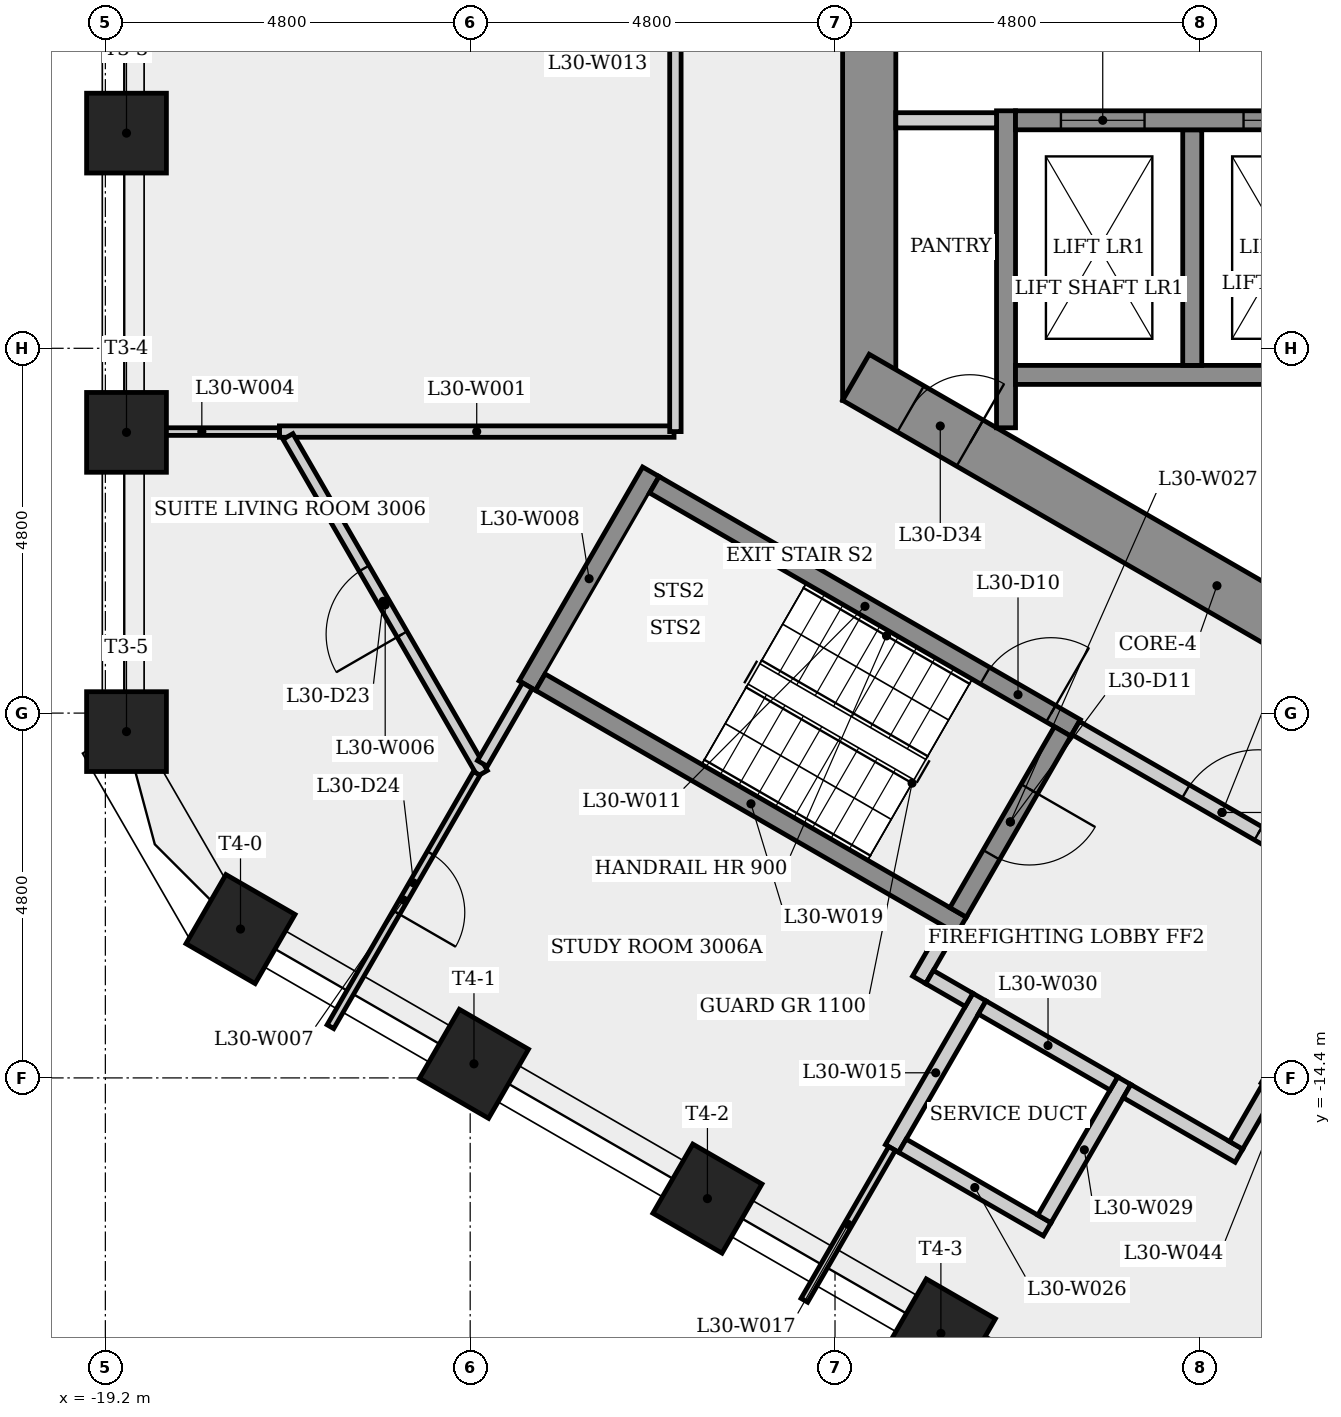
"""IFC4 building model, lengths in metres.
Left out: names, types, materials, properties, quantities, classifications, styles, units other than length and angle.
Written with IfcOpenShell. Run it as: python <this file> out.ifc"""

import sys

from ifc_helpers import new_model, si_unit, direction, frame, frame_2d, origin, origin_2d, place, context, subcontext, project, spatial, rectangle, extrude, element, fill, save


model = new_model("IFC4")
c1 = context("Model", 3, precision=1e-05, world=origin(), true_north=direction((0.0, 1.0)))
c2 = subcontext(c1, "Body", "Model", "MODEL_VIEW")
j1 = project(units=[si_unit("LENGTHUNIT", "METRE"), si_unit("PLANEANGLEUNIT", "RADIAN")], contexts=[c1])
p1 = place(None, origin())
s1 = spatial("IfcSite", under=j1, at=p1, CompositionType="ELEMENT")
p2 = place(p1, origin())
s2 = spatial("IfcBuilding", under=s1, at=p2, CompositionType="ELEMENT")
p3 = place(p2, frame((0.0, 0.0, 113.7)))
s3 = spatial("IfcBuildingStorey", under=s2, at=p3, CompositionType="ELEMENT", Elevation=113.7)
p4 = place(p3, frame((-9.15, 5.485, 0.0), z_axis=(0.0, 0.0, 1.0), x_axis=(0.0, -1.0, 0.0)))
e1 = element("IfcWall", 1, at=p4, inside=s3, PredefinedType="SHEAR", context=c2, shape_type="SweptSolid", body=[
    extrude(rectangle(XDim=10.97, YDim=0.7, at=frame_2d((5.485, 0.0))), origin(), (0.0, 0.0, 1.0), 3.4),
])
p5 = place(p4, frame((4.685, 0.0, 0.0)))
e2 = element("IfcOpeningElement", 2, at=p5, cuts=e1, PredefinedType="OPENING", context=c2, shape_type="SweptSolid", body=[
    extrude(rectangle(XDim=1.6, YDim=2.1, at=frame_2d((0.8, 1.05))), frame((0.0, 0.36, 0.0), z_axis=(0.0, -1.0, 0.0), x_axis=(1.0, 0.0, 0.0)), (0.0, 0.0, 1.0), 0.72),
])
p6 = place(p3, frame((-9.325, -5.182, 0.0), z_axis=(0.0, 0.0, 1.0), x_axis=(0.866023993627, -0.500002442456, 0.0)))
e3 = element("IfcWall", 3, at=p6, inside=s3, PredefinedType="SHEAR", context=c2, shape_type="SweptSolid", body=[
    extrude(rectangle(XDim=10.97, YDim=0.7, at=frame_2d((5.485, 0.0))), origin(), (0.0, 0.0, 1.0), 3.4),
])
p7 = place(p6, frame((0.832, 0.0, 0.0)))
e4 = element("IfcOpeningElement", 4, at=p7, cuts=e3, PredefinedType="OPENING", context=c2, shape_type="SweptSolid", body=[
    extrude(rectangle(XDim=0.9, YDim=2.1, at=frame_2d((0.45, 1.05))), frame((0.0, 0.36, 0.0), z_axis=(0.0, -1.0, 0.0), x_axis=(1.0, 0.0, 0.0)), (0.0, 0.0, 1.0), 0.72),
])
p8 = place(p6, frame((8.152, 0.0, 0.0)))
e5 = element("IfcOpeningElement", 5, at=p8, cuts=e3, PredefinedType="OPENING", context=c2, shape_type="SweptSolid", body=[
    extrude(rectangle(XDim=0.9, YDim=2.1, at=frame_2d((0.45, 1.05))), frame((0.0, 0.36, 0.0), z_axis=(0.0, -1.0, 0.0), x_axis=(1.0, 0.0, 0.0)), (0.0, 0.0, 1.0), 0.72),
])
for number, where, z_axis, x_axis in (
    (6, (-18.922, -1.969, 0.0), (0.0, 0.0, 1.0), (-1.0, 0.0, 0.0)),
    (7, (-18.922, -5.906, 0.0), (0.0, 0.0, 1.0), (-1.0, 0.0, 0.0)),
    (8, (-18.922, -9.844, 0.0), (0.0, 0.0, 1.0), (-1.0, 0.0, 0.0)),
    (9, (-17.422, -12.442, 0.0), (0.0, 0.0, 1.0), (-0.5, -0.866, 0.0)),
    (10, (-14.35, -14.215, 0.0), (0.0, 0.0, 1.0), (-0.5, -0.866, 0.0)),
    (11, (-11.279, -15.988, 0.0), (0.0, 0.0, 1.0), (-0.5, -0.866, 0.0)),
    (12, (-8.207, -17.762, 0.0), (0.0, 0.0, 1.0), (-0.5, -0.866, 0.0)),
):
    element("IfcColumn", number, at=place(p3, frame(where, z_axis=z_axis, x_axis=x_axis)), inside=s3, PredefinedType="COLUMN", context=c2, shape_type="SweptSolid", body=[
        extrude(rectangle(XDim=1.05, YDim=1.05, at=origin_2d()), origin(), (0.0, 0.0, 1.0), 3.4),
    ])
p9 = place(p3, frame((-16.91, -5.896, 0.0), z_axis=(0.0, 0.0, 1.0), x_axis=(1.0, 0.0, 0.0)))
e13 = element("IfcWall", 13, at=p9, inside=s3, PredefinedType="PARTITIONING", context=c2, shape_type="SweptSolid", body=[
    extrude(rectangle(XDim=5.192, YDim=0.15, at=frame_2d((2.596, 0.0))), origin(), (0.0, 0.0, 1.0), 3.05),
])
p10 = place(p3, frame((-16.91, -5.896, 0.0), z_axis=(0.0, 0.0, 1.0), x_axis=(-1.0, 0.0, 0.0)))
e14 = element("IfcWall", 14, at=p10, inside=s3, PredefinedType="PARTITIONING", context=c2, shape_type="SweptSolid", body=[
    extrude(rectangle(XDim=2.042, YDim=0.1, at=frame_2d((1.021, 0.0))), origin(), (0.0, 0.0, 1.0), 3.05),
])
p11 = place(p3, frame((-14.239, -10.393, 0.0), z_axis=(0.0, 0.0, 1.0), x_axis=(-0.499977120269, 0.866038613, 0.0)))
e15 = element("IfcWall", 15, at=p11, inside=s3, PredefinedType="PARTITIONING", context=c2, shape_type="SweptSolid", body=[
    extrude(rectangle(XDim=5.117, YDim=0.15, at=frame_2d((2.559, 0.0))), origin(), (0.0, 0.0, 1.0), 3.05),
])
p12 = place(p11, frame((2.114, 0.0, 0.0)))
e16 = element("IfcOpeningElement", 16, at=p12, cuts=e15, PredefinedType="OPENING", context=c2, shape_type="SweptSolid", body=[
    extrude(rectangle(XDim=1.0, YDim=2.1, at=frame_2d((0.5, 1.05))), frame((0.0, 0.085, 0.0), z_axis=(0.0, -1.0, 0.0), x_axis=(1.0, 0.0, 0.0)), (0.0, 0.0, 1.0), 0.17),
])
p13 = place(p3, frame((-14.314, -10.393, 0.0), z_axis=(0.0, 0.0, 1.0), x_axis=(-0.500013417072, -0.866017657296, 0.0)))
e17 = element("IfcWall", 17, at=p13, inside=s3, PredefinedType="PARTITIONING", context=c2, shape_type="SweptSolid", body=[
    extrude(rectangle(XDim=3.85, YDim=0.1, at=frame_2d((1.925, 0.0))), origin(), (0.0, 0.0, 1.0), 3.05),
])
p14 = place(p13, frame((1.214, 0.0, 0.0)))
e18 = element("IfcOpeningElement", 18, at=p14, cuts=e17, PredefinedType="OPENING", context=c2, shape_type="SweptSolid", body=[
    extrude(rectangle(XDim=0.9, YDim=2.1, at=frame_2d((0.45, 1.05))), frame((0.0, 0.06, 0.0), z_axis=(0.0, -1.0, 0.0), x_axis=(1.0, 0.0, 0.0)), (0.0, 0.0, 1.0), 0.12),
])
p15 = place(p3, frame((-13.648, -9.239, 0.0), z_axis=(0.0, 0.0, 1.0), x_axis=(0.500017246033, 0.866015446554, 0.0)))
e19 = element("IfcWall", 19, at=p15, inside=s3, PredefinedType="SHEAR", context=c2, shape_type="SweptSolid", body=[
    extrude(rectangle(XDim=3.25, YDim=0.25, at=frame_2d((1.625, 0.0))), origin(), (0.0, 0.0, 1.0), 3.05),
])
p16 = place(p3, frame((-13.648, -9.239, 0.0), z_axis=(0.0, 0.0, 1.0), x_axis=(-0.500091824179, -0.865972382579, 0.0)))
e20 = element("IfcWall", 20, at=p16, inside=s3, PredefinedType="PARTITIONING", context=c2, shape_type="SweptSolid", body=[
    extrude(rectangle(XDim=1.182, YDim=0.15, at=frame_2d((0.591, 0.0))), origin(), (0.0, 0.0, 1.0), 3.05),
])
p17 = place(p3, frame((-11.977, -6.595, 0.0), z_axis=(0.0, 0.0, 1.0), x_axis=(0.866025499775, -0.499999833739, 0.0)))
e21 = element("IfcWall", 21, at=p17, inside=s3, PredefinedType="SHEAR", context=c2, shape_type="SweptSolid", body=[
    extrude(rectangle(XDim=6.4, YDim=0.25, at=frame_2d((3.2, 0.0))), origin(), (0.0, 0.0, 1.0), 3.05),
])
p18 = place(p17, frame((5.025, 0.0, 0.0)))
e22 = element("IfcOpeningElement", 22, at=p18, cuts=e21, PredefinedType="OPENING", context=c2, shape_type="SweptSolid", body=[
    extrude(rectangle(XDim=1.0, YDim=2.1, at=frame_2d((0.5, 1.05))), frame((0.0, 0.135, 0.0), z_axis=(0.0, -1.0, 0.0), x_axis=(1.0, 0.0, 0.0)), (0.0, 0.0, 1.0), 0.27),
])
p19 = place(p3, frame((-11.7, -5.896, 0.0), z_axis=(0.0, 0.0, 1.0), x_axis=(0.0, 1.0, 0.0)))
e23 = element("IfcWall", 23, at=p19, inside=s3, PredefinedType="PARTITIONING", context=c2, shape_type="SweptSolid", body=[
    extrude(rectangle(XDim=11.717, YDim=0.15, at=frame_2d((5.858, 0.0))), origin(), (0.0, 0.0, 1.0), 3.05),
])
p20 = place(p19, frame((5.358, 0.0, 0.0)))
e24 = element("IfcOpeningElement", 24, at=p20, cuts=e23, PredefinedType="OPENING", context=c2, shape_type="SweptSolid", body=[
    extrude(rectangle(XDim=1.0, YDim=2.1, at=frame_2d((0.5, 1.05))), frame((0.0, 0.085, 0.0), z_axis=(0.0, -1.0, 0.0), x_axis=(1.0, 0.0, 0.0)), (0.0, 0.0, 1.0), 0.17),
])
p21 = place(p3, frame((-8.85, -15.329, 0.0), z_axis=(0.0, 0.0, 1.0), x_axis=(0.500077740698, 0.865980515519, 0.0)))
e25 = element("IfcWall", 25, at=p21, inside=s3, PredefinedType="PLUMBINGWALL", context=c2, shape_type="SweptSolid", body=[
    extrude(rectangle(XDim=2.3, YDim=0.2, at=frame_2d((1.15, 0.0))), origin(), (0.0, 0.0, 1.0), 3.05),
])
p22 = place(p3, frame((-8.85, -15.329, 0.0), z_axis=(0.0, 0.0, 1.0), x_axis=(-0.500009533716, -0.866019899421, 0.0)))
e26 = element("IfcWall", 26, at=p22, inside=s3, PredefinedType="PARTITIONING", context=c2, shape_type="SweptSolid", body=[
    extrude(rectangle(XDim=2.307, YDim=0.1, at=frame_2d((1.153, 0.0))), origin(), (0.0, 0.0, 1.0), 3.05),
])
p23 = place(p3, frame((-8.493, -13.11, 0.0), z_axis=(0.0, 0.0, 1.0), x_axis=(0.500067724834, 0.865986299303, 0.0)))
e27 = element("IfcWall", 27, at=p23, inside=s3, PredefinedType="PARTITIONING", context=c2, shape_type="SweptSolid", body=[
    extrude(rectangle(XDim=0.775, YDim=0.2, at=frame_2d((0.388, 0.0))), origin(), (0.0, 0.0, 1.0), 3.05),
])
p24 = place(p3, frame((-7.935, -12.393, 0.0), z_axis=(0.0, 0.0, 1.0), x_axis=(-0.866025499775, 0.499999833739, 0.0)))
e28 = element("IfcWall", 28, at=p24, inside=s3, PredefinedType="SHEAR", context=c2, shape_type="SweptSolid", body=[
    extrude(rectangle(XDim=6.4, YDim=0.25, at=frame_2d((3.2, 0.0))), origin(), (0.0, 0.0, 1.0), 3.05),
])
p25 = place(p3, frame((-7.836, -13.373, 0.0), z_axis=(0.0, 0.0, 1.0), x_axis=(-0.866232998003, 0.499640263761, 0.0)))
e29 = element("IfcWall", 29, at=p25, inside=s3, PredefinedType="PARTITIONING", context=c2, shape_type="SweptSolid", body=[
    extrude(rectangle(XDim=0.6, YDim=0.2, at=frame_2d((0.3, 0.0))), origin(), (0.0, 0.0, 1.0), 3.05),
])
p26 = place(p3, frame((-7.35, -5.846, 0.0), z_axis=(0.0, 0.0, 1.0), x_axis=(0.0, 1.0, 0.0)))
e30 = element("IfcWall", 30, at=p26, inside=s3, PredefinedType="SHEAR", context=c2, shape_type="SweptSolid", body=[
    extrude(rectangle(XDim=4.171, YDim=0.25, at=frame_2d((2.085, 0.0))), origin(), (0.0, 0.0, 1.0), 3.05),
])
p27 = place(p3, frame((-7.475, -1.8, 0.0), z_axis=(0.0, 0.0, 1.0), x_axis=(-1.0, 0.0, 0.0)))
e31 = element("IfcWall", 31, at=p27, inside=s3, PredefinedType="PARTITIONING", context=c2, shape_type="SweptSolid", body=[
    extrude(rectangle(XDim=1.325, YDim=0.2, at=frame_2d((0.663, 0.0))), origin(), (0.0, 0.0, 1.0), 3.05),
])
p28 = place(p3, frame((-6.808, -16.392, 0.0), z_axis=(0.0, 0.0, 1.0), x_axis=(-0.866008176907, 0.50002983664, 0.0)))
e32 = element("IfcWall", 32, at=p28, inside=s3, PredefinedType="PLUMBINGWALL", context=c2, shape_type="SweptSolid", body=[
    extrude(rectangle(XDim=2.2, YDim=0.2, at=frame_2d((1.1, 0.0))), origin(), (0.0, 0.0, 1.0), 3.05),
])
p29 = place(p3, frame((-6.605, -9.841, 0.0), z_axis=(0.0, 0.0, 1.0), x_axis=(-0.499996545922, -0.866027397988, 0.0)))
e33 = element("IfcWall", 33, at=p29, inside=s3, PredefinedType="SHEAR", context=c2, shape_type="SweptSolid", body=[
    extrude(rectangle(XDim=2.75, YDim=0.25, at=frame_2d((1.375, 0.0))), origin(), (0.0, 0.0, 1.0), 3.05),
])
p30 = place(p29, frame((0.875, 0.0, 0.0)))
e34 = element("IfcOpeningElement", 34, at=p30, cuts=e33, PredefinedType="OPENING", context=c2, shape_type="SweptSolid", body=[
    extrude(rectangle(XDim=1.0, YDim=2.1, at=frame_2d((0.5, 1.05))), frame((0.0, 0.135, 0.0), z_axis=(0.0, -1.0, 0.0), x_axis=(1.0, 0.0, 0.0)), (0.0, 0.0, 1.0), 0.27),
])
p31 = place(p3, frame((-6.435, -9.795, 0.0), z_axis=(0.0, 0.0, 1.0), x_axis=(0.866012907634, -0.500021643343, 0.0)))
e35 = element("IfcWall", 35, at=p31, inside=s3, PredefinedType="PARTITIONING", context=c2, shape_type="SweptSolid", body=[
    extrude(rectangle(XDim=4.45, YDim=0.2, at=frame_2d((2.225, 0.0))), origin(), (0.0, 0.0, 1.0), 3.05),
])
p32 = place(p31, frame((1.675, 0.0, 0.0)))
e36 = element("IfcOpeningElement", 36, at=p32, cuts=e35, PredefinedType="OPENING", context=c2, shape_type="SweptSolid", body=[
    extrude(rectangle(XDim=1.1, YDim=2.1, at=frame_2d((0.55, 1.05))), frame((0.0, 0.11, 0.0), z_axis=(0.0, -1.0, 0.0), x_axis=(1.0, 0.0, 0.0)), (0.0, 0.0, 1.0), 0.22),
])
p33 = place(p3, frame((-5.795, -14.437, 0.0), z_axis=(0.0, 0.0, 1.0), x_axis=(-0.500027713859, -0.866009402589, 0.0)))
e37 = element("IfcWall", 37, at=p33, inside=s3, PredefinedType="PLUMBINGWALL", context=c2, shape_type="SweptSolid", body=[
    extrude(rectangle(XDim=2.1, YDim=0.2, at=frame_2d((1.05, 0.0))), origin(), (0.0, 0.0, 1.0), 3.05),
])
p34 = place(p3, frame((-5.931, -14.473, 0.0), z_axis=(0.0, 0.0, 1.0), x_axis=(-0.866041268327, 0.499972520799, 0.0)))
e38 = element("IfcWall", 38, at=p34, inside=s3, PredefinedType="PLUMBINGWALL", context=c2, shape_type="SweptSolid", body=[
    extrude(rectangle(XDim=2.0, YDim=0.2, at=frame_2d((1.0, 0.0))), origin(), (0.0, 0.0, 1.0), 3.05),
])
p35 = place(p3, frame((-7.225, -5.15, 0.0), z_axis=(0.0, 0.0, 1.0), x_axis=(1.0, 0.0, 0.0)))
e39 = element("IfcWall", 39, at=p35, inside=s3, PredefinedType="SHEAR", context=c2, shape_type="SweptSolid", body=[
    extrude(rectangle(XDim=14.7, YDim=0.25, at=frame_2d((7.35, 0.0))), origin(), (0.0, 0.0, 1.0), 3.05),
])
p36 = place(p3, frame((-4.9, -1.925, 0.0), z_axis=(0.0, 0.0, 1.0), x_axis=(0.0, -1.0, 0.0)))
e40 = element("IfcWall", 40, at=p36, inside=s3, PredefinedType="SHEAR", context=c2, shape_type="SweptSolid", body=[
    extrude(rectangle(XDim=3.1, YDim=0.25, at=frame_2d((1.55, 0.0))), origin(), (0.0, 0.0, 1.0), 3.4),
])
p37 = place(p3, frame((-7.225, -1.8, 0.0), z_axis=(0.0, 0.0, 1.0), x_axis=(1.0, 0.0, 0.0)))
e41 = element("IfcWall", 41, at=p37, inside=s3, PredefinedType="SHEAR", context=c2, shape_type="SweptSolid", body=[
    extrude(rectangle(XDim=14.7, YDim=0.25, at=frame_2d((7.35, 0.0))), origin(), (0.0, 0.0, 1.0), 3.05),
])
p38 = place(p37, frame((0.597, 0.0, 0.0)))
e42 = element("IfcOpeningElement", 42, at=p38, cuts=e41, PredefinedType="OPENING", context=c2, shape_type="SweptSolid", body=[
    extrude(rectangle(XDim=1.1, YDim=2.1, at=frame_2d((0.55, 1.05))), frame((0.0, 0.135, 0.0), z_axis=(0.0, -1.0, 0.0), x_axis=(1.0, 0.0, 0.0)), (0.0, 0.0, 1.0), 0.27),
])
p39 = place(p37, frame((3.0, 0.0, 0.0)))
e43 = element("IfcOpeningElement", 43, at=p39, cuts=e41, PredefinedType="OPENING", context=c2, shape_type="SweptSolid", body=[
    extrude(rectangle(XDim=1.1, YDim=2.1, at=frame_2d((0.55, 1.05))), frame((0.0, 0.135, 0.0), z_axis=(0.0, -1.0, 0.0), x_axis=(1.0, 0.0, 0.0)), (0.0, 0.0, 1.0), 0.27),
])
p40 = place(p37, frame((5.45, 0.0, 0.0)))
e44 = element("IfcOpeningElement", 44, at=p40, cuts=e41, PredefinedType="OPENING", context=c2, shape_type="SweptSolid", body=[
    extrude(rectangle(XDim=1.1, YDim=2.1, at=frame_2d((0.55, 1.05))), frame((0.0, 0.135, 0.0), z_axis=(0.0, -1.0, 0.0), x_axis=(1.0, 0.0, 0.0)), (0.0, 0.0, 1.0), 0.27),
])
p41 = place(p37, frame((7.9, 0.0, 0.0)))
e45 = element("IfcOpeningElement", 45, at=p41, cuts=e41, PredefinedType="OPENING", context=c2, shape_type="SweptSolid", body=[
    extrude(rectangle(XDim=1.1, YDim=2.1, at=frame_2d((0.55, 1.05))), frame((0.0, 0.135, 0.0), z_axis=(0.0, -1.0, 0.0), x_axis=(1.0, 0.0, 0.0)), (0.0, 0.0, 1.0), 0.27),
])
p42 = place(p37, frame((10.35, 0.0, 0.0)))
e46 = element("IfcOpeningElement", 46, at=p42, cuts=e41, PredefinedType="OPENING", context=c2, shape_type="SweptSolid", body=[
    extrude(rectangle(XDim=1.1, YDim=2.1, at=frame_2d((0.55, 1.05))), frame((0.0, 0.135, 0.0), z_axis=(0.0, -1.0, 0.0), x_axis=(1.0, 0.0, 0.0)), (0.0, 0.0, 1.0), 0.27),
])
p43 = place(p3, frame((-4.286, -15.423, 0.0), z_axis=(0.0, 0.0, 1.0), x_axis=(-0.866025371046, 0.500000056704, 0.0)))
e47 = element("IfcWall", 47, at=p43, inside=s3, PredefinedType="PARTITIONING", context=c2, shape_type="SweptSolid", body=[
    extrude(rectangle(XDim=1.7, YDim=0.2, at=frame_2d((0.85, 0.0))), origin(), (0.0, 0.0, 1.0), 3.05),
])
p44 = place(p3, frame((-3.885, -14.529, 0.0), z_axis=(0.0, 0.0, 1.0), x_axis=(-0.499859285417, -0.866106630146, 0.0)))
e48 = element("IfcWall", 48, at=p44, inside=s3, PredefinedType="PARTITIONING", context=c2, shape_type="SweptSolid", body=[
    extrude(rectangle(XDim=0.875, YDim=0.2, at=frame_2d((0.438, 0.0))), origin(), (0.0, 0.0, 1.0), 3.05),
])
p45 = place(p38, origin())
e49 = element("IfcDoor", 49, at=p45, inside=s3, OperationType="SLIDING_TO_LEFT", PredefinedType="DOOR", context=c2, shape_type="SweptSolid", body=[
    extrude(rectangle(XDim=1.1, YDim=2.1, at=frame_2d((0.55, 1.05))), frame((0.0, 0.025, 0.0), z_axis=(0.0, -1.0, 0.0), x_axis=(1.0, 0.0, 0.0)), (0.0, 0.0, 1.0), 0.05),
])
fill(e42, e49)
p46 = place(p39, origin())
e50 = element("IfcDoor", 50, at=p46, inside=s3, OperationType="SLIDING_TO_LEFT", PredefinedType="DOOR", context=c2, shape_type="SweptSolid", body=[
    extrude(rectangle(XDim=1.1, YDim=2.1, at=frame_2d((0.55, 1.05))), frame((0.0, 0.025, 0.0), z_axis=(0.0, -1.0, 0.0), x_axis=(1.0, 0.0, 0.0)), (0.0, 0.0, 1.0), 0.05),
])
fill(e43, e50)
p47 = place(p18, origin())
e51 = element("IfcDoor", 51, at=p47, inside=s3, OperationType="SINGLE_SWING_RIGHT", PredefinedType="DOOR", context=c2, shape_type="SweptSolid", body=[
    extrude(rectangle(XDim=1.0, YDim=2.1, at=frame_2d((0.5, 1.05))), frame((0.0, 0.025, 0.0), z_axis=(0.0, -1.0, 0.0), x_axis=(1.0, 0.0, 0.0)), (0.0, 0.0, 1.0), 0.05),
])
fill(e22, e51)
p48 = place(p30, origin())
e52 = element("IfcDoor", 52, at=p48, inside=s3, OperationType="SINGLE_SWING_LEFT", PredefinedType="DOOR", context=c2, shape_type="SweptSolid", body=[
    extrude(rectangle(XDim=1.0, YDim=2.1, at=frame_2d((0.5, 1.05))), frame((0.0, 0.025, 0.0), z_axis=(0.0, -1.0, 0.0), x_axis=(1.0, 0.0, 0.0)), (0.0, 0.0, 1.0), 0.05),
])
fill(e34, e52)
p49 = place(p32, origin())
e53 = element("IfcDoor", 53, at=p49, inside=s3, OperationType="SINGLE_SWING_RIGHT", PredefinedType="DOOR", context=c2, shape_type="SweptSolid", body=[
    extrude(rectangle(XDim=1.1, YDim=2.1, at=frame_2d((0.55, 1.05))), frame((0.0, 0.025, 0.0), z_axis=(0.0, -1.0, 0.0), x_axis=(1.0, 0.0, 0.0)), (0.0, 0.0, 1.0), 0.05),
])
fill(e36, e53)
p50 = place(p12, origin())
e54 = element("IfcDoor", 54, at=p50, inside=s3, OperationType="SINGLE_SWING_LEFT", PredefinedType="DOOR", context=c2, shape_type="SweptSolid", body=[
    extrude(rectangle(XDim=1.0, YDim=2.1, at=frame_2d((0.5, 1.05))), frame((0.0, 0.025, 0.0), z_axis=(0.0, -1.0, 0.0), x_axis=(1.0, 0.0, 0.0)), (0.0, 0.0, 1.0), 0.05),
])
fill(e16, e54)
p51 = place(p14, origin())
e55 = element("IfcDoor", 55, at=p51, inside=s3, OperationType="SINGLE_SWING_RIGHT", PredefinedType="DOOR", context=c2, shape_type="SweptSolid", body=[
    extrude(rectangle(XDim=0.9, YDim=2.1, at=frame_2d((0.45, 1.05))), frame((0.0, 0.025, 0.0), z_axis=(0.0, -1.0, 0.0), x_axis=(1.0, 0.0, 0.0)), (0.0, 0.0, 1.0), 0.05),
])
fill(e18, e55)
p52 = place(p7, origin())
e56 = element("IfcDoor", 56, at=p52, inside=s3, OperationType="SINGLE_SWING_RIGHT", PredefinedType="DOOR", context=c2, shape_type="SweptSolid", body=[
    extrude(rectangle(XDim=0.9, YDim=2.1, at=frame_2d((0.45, 1.05))), frame((0.0, 0.025, 0.0), z_axis=(0.0, -1.0, 0.0), x_axis=(1.0, 0.0, 0.0)), (0.0, 0.0, 1.0), 0.05),
])
fill(e4, e56)
save(model, sys.argv[1])
